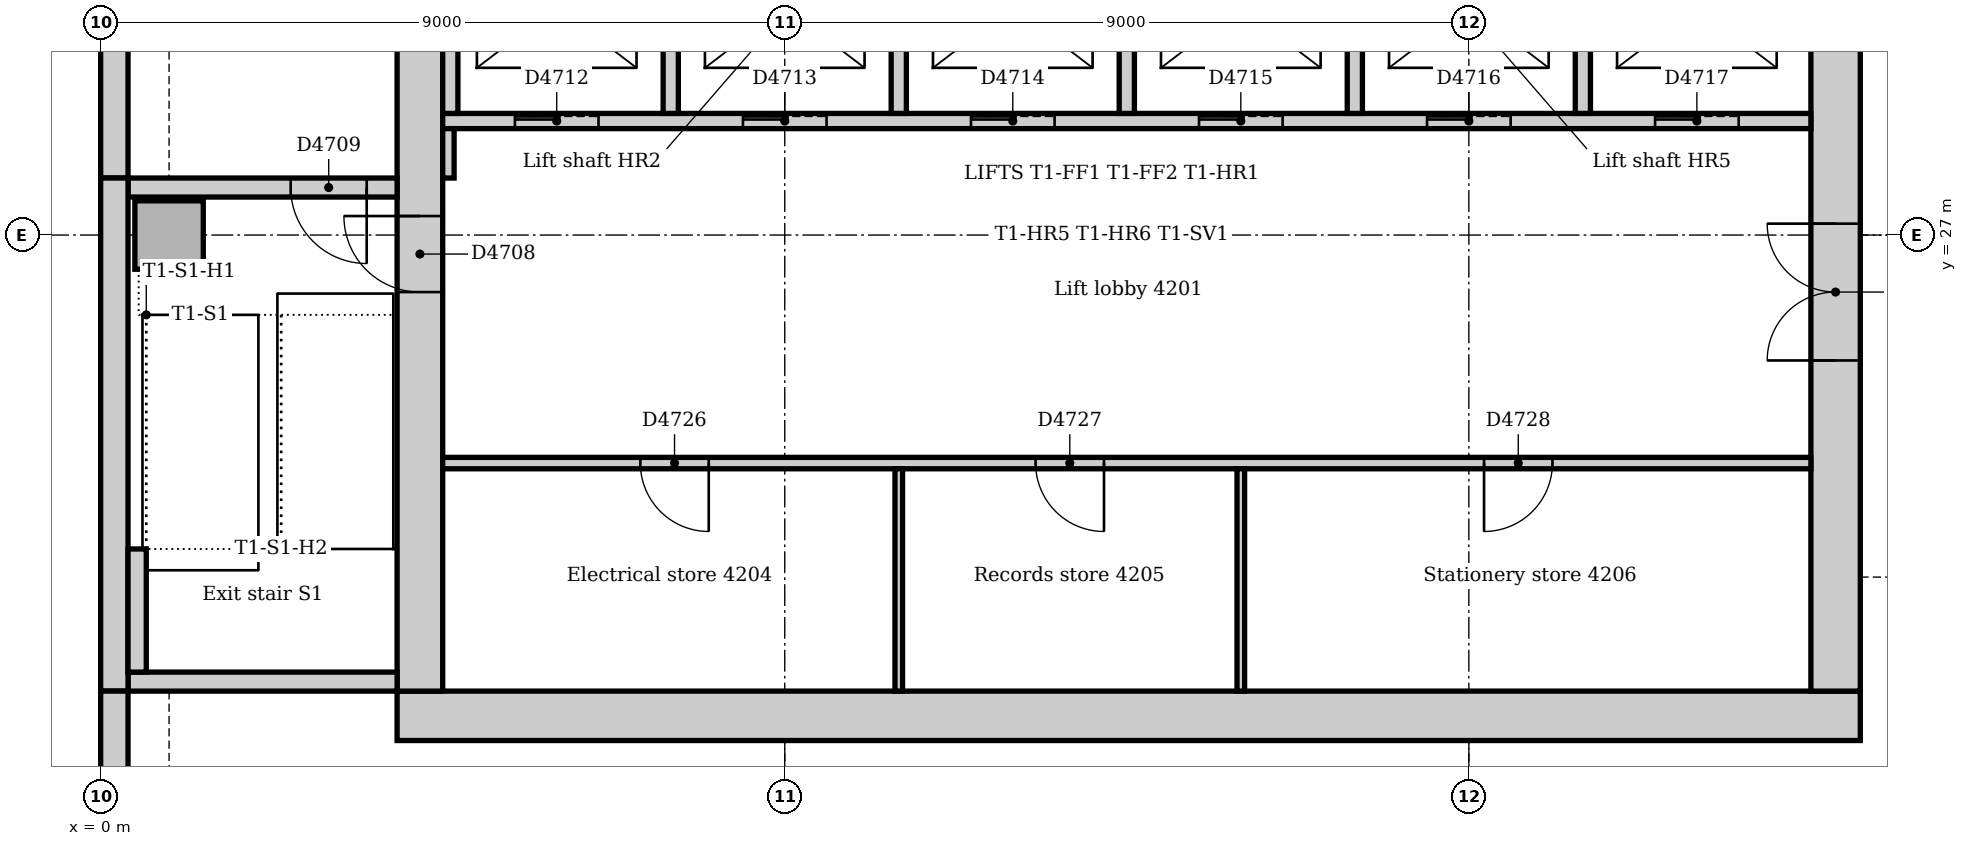
"""IFC4 building model, lengths in metres.
Left out: names, types, materials, properties, quantities, classifications, styles, units other than length and angle.
Written with IfcOpenShell. Run it as: python <this file> out.ifc"""

import sys

from ifc_helpers import new_model, si_unit, direction, frame, frame_2d, origin, origin_2d, place, context, subcontext, project, spatial, rectangle, extrude, element, fill, save


model = new_model("IFC4")
c1 = context("Model", 3, precision=1e-05, world=origin(), true_north=direction((0.0, 1.0)))
c2 = subcontext(c1, "Body", "Model", "MODEL_VIEW")
j1 = project(units=[si_unit("LENGTHUNIT", "METRE"), si_unit("PLANEANGLEUNIT", "RADIAN")], contexts=[c1])
p1 = place(None, origin())
s1 = spatial("IfcSite", under=j1, at=p1, CompositionType="ELEMENT")
p2 = place(p1, origin())
s2 = spatial("IfcBuilding", under=s1, at=p2, CompositionType="ELEMENT")
p3 = place(p2, frame((0.0, 0.0, 177.0)))
s3 = spatial("IfcBuildingStorey", under=s2, at=p3, CompositionType="ELEMENT", Elevation=177.0)
p4 = place(p3, frame((3.9, 20.675, 0.0), z_axis=(0.0, 0.0, 1.0), x_axis=(1.0, 0.0, 0.0)))
e1 = element("IfcWall", 1, at=p4, inside=s3, PredefinedType="SOLIDWALL", context=c2, shape_type="SweptSolid", body=[
    extrude(rectangle(XDim=19.25, YDim=0.65, at=frame_2d((9.625, 0.0))), origin(), (0.0, 0.0, 1.0), 4.0),
])
p5 = place(p3, frame((22.825, 21.0, 0.0), z_axis=(0.0, 0.0, 1.0), x_axis=(0.0, 1.0, 0.0)))
e2 = element("IfcWall", 2, at=p5, inside=s3, PredefinedType="SOLIDWALL", context=c2, shape_type="SweptSolid", body=[
    extrude(rectangle(XDim=10.5, YDim=0.65, at=frame_2d((5.25, 0.0))), origin(), (0.0, 0.0, 1.0), 4.0),
])
p6 = place(p5, frame((4.35, 0.0, 0.0)))
e3 = element("IfcOpeningElement", 3, at=p6, cuts=e2, PredefinedType="OPENING", context=c2, shape_type="SweptSolid", body=[
    extrude(rectangle(XDim=1.8, YDim=2.1, at=frame_2d((0.9, 1.05))), frame((0.0, 0.335, 0.0), z_axis=(0.0, -1.0, 0.0), x_axis=(1.0, 0.0, 0.0)), (0.0, 0.0, 1.0), 0.67),
])
p7 = place(p3, frame((4.2, 31.5, 0.0), z_axis=(0.0, 0.0, 1.0), x_axis=(0.0, -1.0, 0.0)))
e4 = element("IfcWall", 4, at=p7, inside=s3, PredefinedType="SOLIDWALL", context=c2, shape_type="SweptSolid", body=[
    extrude(rectangle(XDim=10.5, YDim=0.6, at=frame_2d((5.25, 0.0))), origin(), (0.0, 0.0, 1.0), 4.0),
])
p8 = place(p7, frame((4.25, 0.0, 0.0)))
e5 = element("IfcOpeningElement", 5, at=p8, cuts=e4, PredefinedType="OPENING", context=c2, shape_type="SweptSolid", body=[
    extrude(rectangle(XDim=1.0, YDim=2.1, at=frame_2d((0.5, 1.05))), frame((0.0, 0.31, 0.0), z_axis=(0.0, -1.0, 0.0), x_axis=(1.0, 0.0, 0.0)), (0.0, 0.0, 1.0), 0.62),
])
p9 = place(p3, frame((0.36, 21.125, 0.0), z_axis=(0.0, 0.0, 1.0), x_axis=(1.0, 0.0, 0.0)))
e6 = element("IfcWall", 6, at=p9, inside=s3, PredefinedType="SOLIDWALL", context=c2, shape_type="SweptSolid", body=[
    extrude(rectangle(XDim=3.54, YDim=0.25, at=frame_2d((1.77, 0.0))), origin(), (0.0, 0.0, 1.0), 4.0),
])
p10 = place(p3, frame((3.9, 27.625, 0.0), z_axis=(0.0, 0.0, 1.0), x_axis=(-1.0, 0.0, 0.0)))
e7 = element("IfcWall", 7, at=p10, inside=s3, PredefinedType="SOLIDWALL", context=c2, shape_type="SweptSolid", body=[
    extrude(rectangle(XDim=3.54, YDim=0.25, at=frame_2d((1.77, 0.0))), origin(), (0.0, 0.0, 1.0), 4.0),
])
p11 = place(p10, frame((0.4, 0.0, 0.0)))
e8 = element("IfcOpeningElement", 8, at=p11, cuts=e7, PredefinedType="OPENING", context=c2, shape_type="SweptSolid", body=[
    extrude(rectangle(XDim=1.0, YDim=2.1, at=frame_2d((0.5, 1.05))), frame((0.0, 0.135, 0.0), z_axis=(0.0, -1.0, 0.0), x_axis=(1.0, 0.0, 0.0)), (0.0, 0.0, 1.0), 0.27),
])
p12 = place(p3, frame((0.9, 27.0, 0.0), z_axis=(0.0, 0.0, 1.0), x_axis=(1.0, 0.0, 0.0)))
e9 = element("IfcColumn", 9, at=p12, inside=s3, PredefinedType="COLUMN", context=c2, shape_type="SweptSolid", body=[
    extrude(rectangle(XDim=0.9, YDim=0.9, at=origin_2d()), origin(), (0.0, 0.0, 1.0), 4.0),
])
p13 = place(p3, frame((0.18, 35.25, 0.0), z_axis=(0.0, 0.0, 1.0), x_axis=(0.0, -1.0, 0.0)))
e10 = element("IfcWall", 10, at=p13, inside=s3, PredefinedType="STANDARD", context=c2, shape_type="SweptSolid", body=[
    extrude(rectangle(XDim=7.5, YDim=0.36, at=frame_2d((3.75, 0.0))), origin(), (0.0, 0.0, 1.0), 3.85),
])
p14 = place(p3, frame((0.18, 27.75, 0.0), z_axis=(0.0, 0.0, 1.0), x_axis=(0.0, -1.0, 0.0)))
e11 = element("IfcWall", 11, at=p14, inside=s3, PredefinedType="STANDARD", context=c2, shape_type="SweptSolid", body=[
    extrude(rectangle(XDim=6.75, YDim=0.36, at=frame_2d((3.375, 0.0))), origin(), (0.0, 0.0, 1.0), 3.85),
])
p15 = place(p3, frame((0.18, 21.0, 0.0), z_axis=(0.0, 0.0, 1.0), x_axis=(0.0, -1.0, 0.0)))
e12 = element("IfcWall", 12, at=p15, inside=s3, PredefinedType="STANDARD", context=c2, shape_type="SweptSolid", body=[
    extrude(rectangle(XDim=7.757, YDim=0.36, at=frame_2d((3.879, 0.0))), origin(), (0.0, 0.0, 1.0), 3.85),
])
p16 = place(p15, frame((1.35, 0.0, 0.9)))
e13 = element("IfcOpeningElement", 13, at=p16, cuts=e12, PredefinedType="OPENING", context=c2, shape_type="SweptSolid", body=[
    extrude(rectangle(XDim=3.3, YDim=1.6, at=frame_2d((1.65, 0.8))), frame((0.0, 0.19, 0.0), z_axis=(0.0, -1.0, 0.0), x_axis=(1.0, 0.0, 0.0)), (0.0, 0.0, 1.0), 0.38),
])
p17 = place(p3, frame((0.48, 21.25, 0.0), z_axis=(0.0, 0.0, 1.0), x_axis=(0.0, 1.0, 0.0)))
e14 = element("IfcWall", 14, at=p17, inside=s3, PredefinedType="STANDARD", context=c2, shape_type="SweptSolid", body=[
    extrude(rectangle(XDim=1.62, YDim=0.24, at=frame_2d((0.81, 0.0))), origin(), (0.0, 0.0, 1.0), 4.0),
])
p18 = place(p3, frame((4.5, 28.5, 0.0), z_axis=(0.0, 0.0, 1.0), x_axis=(1.0, 0.0, 0.0)))
e15 = element("IfcWall", 15, at=p18, inside=s3, PredefinedType="PARTITIONING", context=c2, shape_type="SweptSolid", body=[
    extrude(rectangle(XDim=18.0, YDim=0.2, at=frame_2d((9.0, 0.0))), origin(), (0.0, 0.0, 1.0), 3.85),
])
p19 = place(p18, frame((0.95, 0.0, 0.0)))
e16 = element("IfcOpeningElement", 16, at=p19, cuts=e15, PredefinedType="OPENING", context=c2, shape_type="SweptSolid", body=[
    extrude(rectangle(XDim=1.1, YDim=2.1, at=frame_2d((0.55, 1.05))), frame((0.0, 0.11, 0.0), z_axis=(0.0, -1.0, 0.0), x_axis=(1.0, 0.0, 0.0)), (0.0, 0.0, 1.0), 0.22),
])
p20 = place(p18, frame((3.95, 0.0, 0.0)))
e17 = element("IfcOpeningElement", 17, at=p20, cuts=e15, PredefinedType="OPENING", context=c2, shape_type="SweptSolid", body=[
    extrude(rectangle(XDim=1.1, YDim=2.1, at=frame_2d((0.55, 1.05))), frame((0.0, 0.11, 0.0), z_axis=(0.0, -1.0, 0.0), x_axis=(1.0, 0.0, 0.0)), (0.0, 0.0, 1.0), 0.22),
])
p21 = place(p18, frame((6.95, 0.0, 0.0)))
e18 = element("IfcOpeningElement", 18, at=p21, cuts=e15, PredefinedType="OPENING", context=c2, shape_type="SweptSolid", body=[
    extrude(rectangle(XDim=1.1, YDim=2.1, at=frame_2d((0.55, 1.05))), frame((0.0, 0.11, 0.0), z_axis=(0.0, -1.0, 0.0), x_axis=(1.0, 0.0, 0.0)), (0.0, 0.0, 1.0), 0.22),
])
p22 = place(p18, frame((9.95, 0.0, 0.0)))
e19 = element("IfcOpeningElement", 19, at=p22, cuts=e15, PredefinedType="OPENING", context=c2, shape_type="SweptSolid", body=[
    extrude(rectangle(XDim=1.1, YDim=2.1, at=frame_2d((0.55, 1.05))), frame((0.0, 0.11, 0.0), z_axis=(0.0, -1.0, 0.0), x_axis=(1.0, 0.0, 0.0)), (0.0, 0.0, 1.0), 0.22),
])
p23 = place(p18, frame((12.95, 0.0, 0.0)))
e20 = element("IfcOpeningElement", 20, at=p23, cuts=e15, PredefinedType="OPENING", context=c2, shape_type="SweptSolid", body=[
    extrude(rectangle(XDim=1.1, YDim=2.1, at=frame_2d((0.55, 1.05))), frame((0.0, 0.11, 0.0), z_axis=(0.0, -1.0, 0.0), x_axis=(1.0, 0.0, 0.0)), (0.0, 0.0, 1.0), 0.22),
])
p24 = place(p18, frame((15.95, 0.0, 0.0)))
e21 = element("IfcOpeningElement", 21, at=p24, cuts=e15, PredefinedType="OPENING", context=c2, shape_type="SweptSolid", body=[
    extrude(rectangle(XDim=1.1, YDim=2.1, at=frame_2d((0.55, 1.05))), frame((0.0, 0.11, 0.0), z_axis=(0.0, -1.0, 0.0), x_axis=(1.0, 0.0, 0.0)), (0.0, 0.0, 1.0), 0.22),
])
for number, where, z_axis, x_axis in (
    (22, (10.5, 28.6, 0.0), (0.0, 0.0, 1.0), (0.0, 1.0, 0.0)),
    (23, (13.5, 28.6, 0.0), (0.0, 0.0, 1.0), (0.0, 1.0, 0.0)),
    (24, (16.5, 28.6, 0.0), (0.0, 0.0, 1.0), (0.0, 1.0, 0.0)),
    (25, (19.5, 28.6, 0.0), (0.0, 0.0, 1.0), (0.0, 1.0, 0.0)),
    (26, (4.6, 28.6, 0.0), (0.0, 0.0, 1.0), (0.0, 1.0, 0.0)),
    (27, (7.5, 28.6, 0.0), (0.0, 0.0, 1.0), (0.0, 1.0, 0.0)),
):
    element("IfcWall", number, at=place(p3, frame(where, z_axis=z_axis, x_axis=x_axis)), inside=s3, PredefinedType="PARTITIONING", context=c2, shape_type="SweptSolid", body=[
        extrude(rectangle(XDim=2.65, YDim=0.2, at=frame_2d((1.325, 0.0))), origin(), (0.0, 0.0, 1.0), 3.85),
    ])
p25 = place(p3, frame((4.5, 24.0, 0.0), z_axis=(0.0, 0.0, 1.0), x_axis=(1.0, 0.0, 0.0)))
e28 = element("IfcWall", 28, at=p25, inside=s3, PredefinedType="PARTITIONING", context=c2, shape_type="SweptSolid", body=[
    extrude(rectangle(XDim=18.0, YDim=0.15, at=frame_2d((9.0, 0.0))), origin(), (0.0, 0.0, 1.0), 3.85),
])
p26 = place(p25, frame((2.6, 0.0, 0.0)))
e29 = element("IfcOpeningElement", 29, at=p26, cuts=e28, PredefinedType="OPENING", context=c2, shape_type="SweptSolid", body=[
    extrude(rectangle(XDim=0.9, YDim=2.1, at=frame_2d((0.45, 1.05))), frame((0.0, 0.085, 0.0), z_axis=(0.0, -1.0, 0.0), x_axis=(1.0, 0.0, 0.0)), (0.0, 0.0, 1.0), 0.17),
])
p27 = place(p25, frame((7.8, 0.0, 0.0)))
e30 = element("IfcOpeningElement", 30, at=p27, cuts=e28, PredefinedType="OPENING", context=c2, shape_type="SweptSolid", body=[
    extrude(rectangle(XDim=0.9, YDim=2.1, at=frame_2d((0.45, 1.05))), frame((0.0, 0.085, 0.0), z_axis=(0.0, -1.0, 0.0), x_axis=(1.0, 0.0, 0.0)), (0.0, 0.0, 1.0), 0.17),
])
p28 = place(p25, frame((13.7, 0.0, 0.0)))
e31 = element("IfcOpeningElement", 31, at=p28, cuts=e28, PredefinedType="OPENING", context=c2, shape_type="SweptSolid", body=[
    extrude(rectangle(XDim=0.9, YDim=2.1, at=frame_2d((0.45, 1.05))), frame((0.0, 0.085, 0.0), z_axis=(0.0, -1.0, 0.0), x_axis=(1.0, 0.0, 0.0)), (0.0, 0.0, 1.0), 0.17),
])
p29 = place(p3, frame((4.575, 27.75, 0.0), z_axis=(0.0, 0.0, 1.0), x_axis=(0.0, 1.0, 0.0)))
e32 = element("IfcWall", 32, at=p29, inside=s3, PredefinedType="PARTITIONING", context=c2, shape_type="SweptSolid", body=[
    extrude(rectangle(XDim=0.65, YDim=0.15, at=frame_2d((0.325, 0.0))), origin(), (0.0, 0.0, 1.0), 3.85),
])
for number, where, z_axis, x_axis in (
    (33, (10.5, 21.0, 0.0), (0.0, 0.0, 1.0), (0.0, 1.0, 0.0)),
    (34, (15.0, 21.0, 0.0), (0.0, 0.0, 1.0), (0.0, 1.0, 0.0)),
):
    element("IfcWall", number, at=place(p3, frame(where, z_axis=z_axis, x_axis=x_axis)), inside=s3, PredefinedType="PARTITIONING", context=c2, shape_type="SweptSolid", body=[
        extrude(rectangle(XDim=2.925, YDim=0.1, at=frame_2d((1.462, 0.0))), origin(), (0.0, 0.0, 1.0), 3.85),
    ])
p30 = place(p8, frame((1.0, 0.0, 0.0), z_axis=(0.0, 0.0, 1.0), x_axis=(-1.0, 0.0, 0.0)))
e35 = element("IfcDoor", 35, at=p30, inside=s3, OperationType="SINGLE_SWING_RIGHT", PredefinedType="DOOR", context=c2, shape_type="SweptSolid", body=[
    extrude(rectangle(XDim=1.0, YDim=2.1, at=frame_2d((0.5, 1.05))), frame((0.0, 0.025, 0.0), z_axis=(0.0, -1.0, 0.0), x_axis=(1.0, 0.0, 0.0)), (0.0, 0.0, 1.0), 0.05),
])
fill(e5, e35)
p31 = place(p11, origin())
e36 = element("IfcDoor", 36, at=p31, inside=s3, OperationType="SINGLE_SWING_LEFT", PredefinedType="DOOR", context=c2, shape_type="SweptSolid", body=[
    extrude(rectangle(XDim=1.0, YDim=2.1, at=frame_2d((0.5, 1.05))), frame((0.0, 0.025, 0.0), z_axis=(0.0, -1.0, 0.0), x_axis=(1.0, 0.0, 0.0)), (0.0, 0.0, 1.0), 0.05),
])
fill(e8, e36)
p32 = place(p19, origin())
e37 = element("IfcDoor", 37, at=p32, inside=s3, OperationType="SLIDING_TO_LEFT", PredefinedType="DOOR", context=c2, shape_type="SweptSolid", body=[
    extrude(rectangle(XDim=1.1, YDim=2.1, at=frame_2d((0.55, 1.05))), frame((0.0, 0.025, 0.0), z_axis=(0.0, -1.0, 0.0), x_axis=(1.0, 0.0, 0.0)), (0.0, 0.0, 1.0), 0.05),
])
fill(e16, e37)
p33 = place(p20, origin())
e38 = element("IfcDoor", 38, at=p33, inside=s3, OperationType="SLIDING_TO_LEFT", PredefinedType="DOOR", context=c2, shape_type="SweptSolid", body=[
    extrude(rectangle(XDim=1.1, YDim=2.1, at=frame_2d((0.55, 1.05))), frame((0.0, 0.025, 0.0), z_axis=(0.0, -1.0, 0.0), x_axis=(1.0, 0.0, 0.0)), (0.0, 0.0, 1.0), 0.05),
])
fill(e17, e38)
p34 = place(p21, origin())
e39 = element("IfcDoor", 39, at=p34, inside=s3, OperationType="SLIDING_TO_LEFT", PredefinedType="DOOR", context=c2, shape_type="SweptSolid", body=[
    extrude(rectangle(XDim=1.1, YDim=2.1, at=frame_2d((0.55, 1.05))), frame((0.0, 0.025, 0.0), z_axis=(0.0, -1.0, 0.0), x_axis=(1.0, 0.0, 0.0)), (0.0, 0.0, 1.0), 0.05),
])
fill(e18, e39)
p35 = place(p22, origin())
e40 = element("IfcDoor", 40, at=p35, inside=s3, OperationType="SLIDING_TO_LEFT", PredefinedType="DOOR", context=c2, shape_type="SweptSolid", body=[
    extrude(rectangle(XDim=1.1, YDim=2.1, at=frame_2d((0.55, 1.05))), frame((0.0, 0.025, 0.0), z_axis=(0.0, -1.0, 0.0), x_axis=(1.0, 0.0, 0.0)), (0.0, 0.0, 1.0), 0.05),
])
fill(e19, e40)
p36 = place(p23, origin())
e41 = element("IfcDoor", 41, at=p36, inside=s3, OperationType="SLIDING_TO_LEFT", PredefinedType="DOOR", context=c2, shape_type="SweptSolid", body=[
    extrude(rectangle(XDim=1.1, YDim=2.1, at=frame_2d((0.55, 1.05))), frame((0.0, 0.025, 0.0), z_axis=(0.0, -1.0, 0.0), x_axis=(1.0, 0.0, 0.0)), (0.0, 0.0, 1.0), 0.05),
])
fill(e20, e41)
p37 = place(p24, origin())
e42 = element("IfcDoor", 42, at=p37, inside=s3, OperationType="SLIDING_TO_LEFT", PredefinedType="DOOR", context=c2, shape_type="SweptSolid", body=[
    extrude(rectangle(XDim=1.1, YDim=2.1, at=frame_2d((0.55, 1.05))), frame((0.0, 0.025, 0.0), z_axis=(0.0, -1.0, 0.0), x_axis=(1.0, 0.0, 0.0)), (0.0, 0.0, 1.0), 0.05),
])
fill(e21, e42)
p38 = place(p6, origin())
e43 = element("IfcDoor", 43, at=p38, inside=s3, OperationType="DOUBLE_DOOR_DOUBLE_SWING", PredefinedType="DOOR", context=c2, shape_type="SweptSolid", body=[
    extrude(rectangle(XDim=1.8, YDim=2.1, at=frame_2d((0.9, 1.05))), frame((0.0, 0.025, 0.0), z_axis=(0.0, -1.0, 0.0), x_axis=(1.0, 0.0, 0.0)), (0.0, 0.0, 1.0), 0.05),
])
fill(e3, e43)
p39 = place(p26, frame((0.9, 0.0, 0.0), z_axis=(0.0, 0.0, 1.0), x_axis=(-1.0, 0.0, 0.0)))
e44 = element("IfcDoor", 44, at=p39, inside=s3, OperationType="SINGLE_SWING_LEFT", PredefinedType="DOOR", context=c2, shape_type="SweptSolid", body=[
    extrude(rectangle(XDim=0.9, YDim=2.1, at=frame_2d((0.45, 1.05))), frame((0.0, 0.025, 0.0), z_axis=(0.0, -1.0, 0.0), x_axis=(1.0, 0.0, 0.0)), (0.0, 0.0, 1.0), 0.05),
])
fill(e29, e44)
p40 = place(p27, frame((0.9, 0.0, 0.0), z_axis=(0.0, 0.0, 1.0), x_axis=(-1.0, 0.0, 0.0)))
e45 = element("IfcDoor", 45, at=p40, inside=s3, OperationType="SINGLE_SWING_LEFT", PredefinedType="DOOR", context=c2, shape_type="SweptSolid", body=[
    extrude(rectangle(XDim=0.9, YDim=2.1, at=frame_2d((0.45, 1.05))), frame((0.0, 0.025, 0.0), z_axis=(0.0, -1.0, 0.0), x_axis=(1.0, 0.0, 0.0)), (0.0, 0.0, 1.0), 0.05),
])
fill(e30, e45)
p41 = place(p28, frame((0.9, 0.0, 0.0), z_axis=(0.0, 0.0, 1.0), x_axis=(-1.0, 0.0, 0.0)))
e46 = element("IfcDoor", 46, at=p41, inside=s3, OperationType="SINGLE_SWING_RIGHT", PredefinedType="DOOR", context=c2, shape_type="SweptSolid", body=[
    extrude(rectangle(XDim=0.9, YDim=2.1, at=frame_2d((0.45, 1.05))), frame((0.0, 0.025, 0.0), z_axis=(0.0, -1.0, 0.0), x_axis=(1.0, 0.0, 0.0)), (0.0, 0.0, 1.0), 0.05),
])
fill(e31, e46)
save(model, sys.argv[1])
